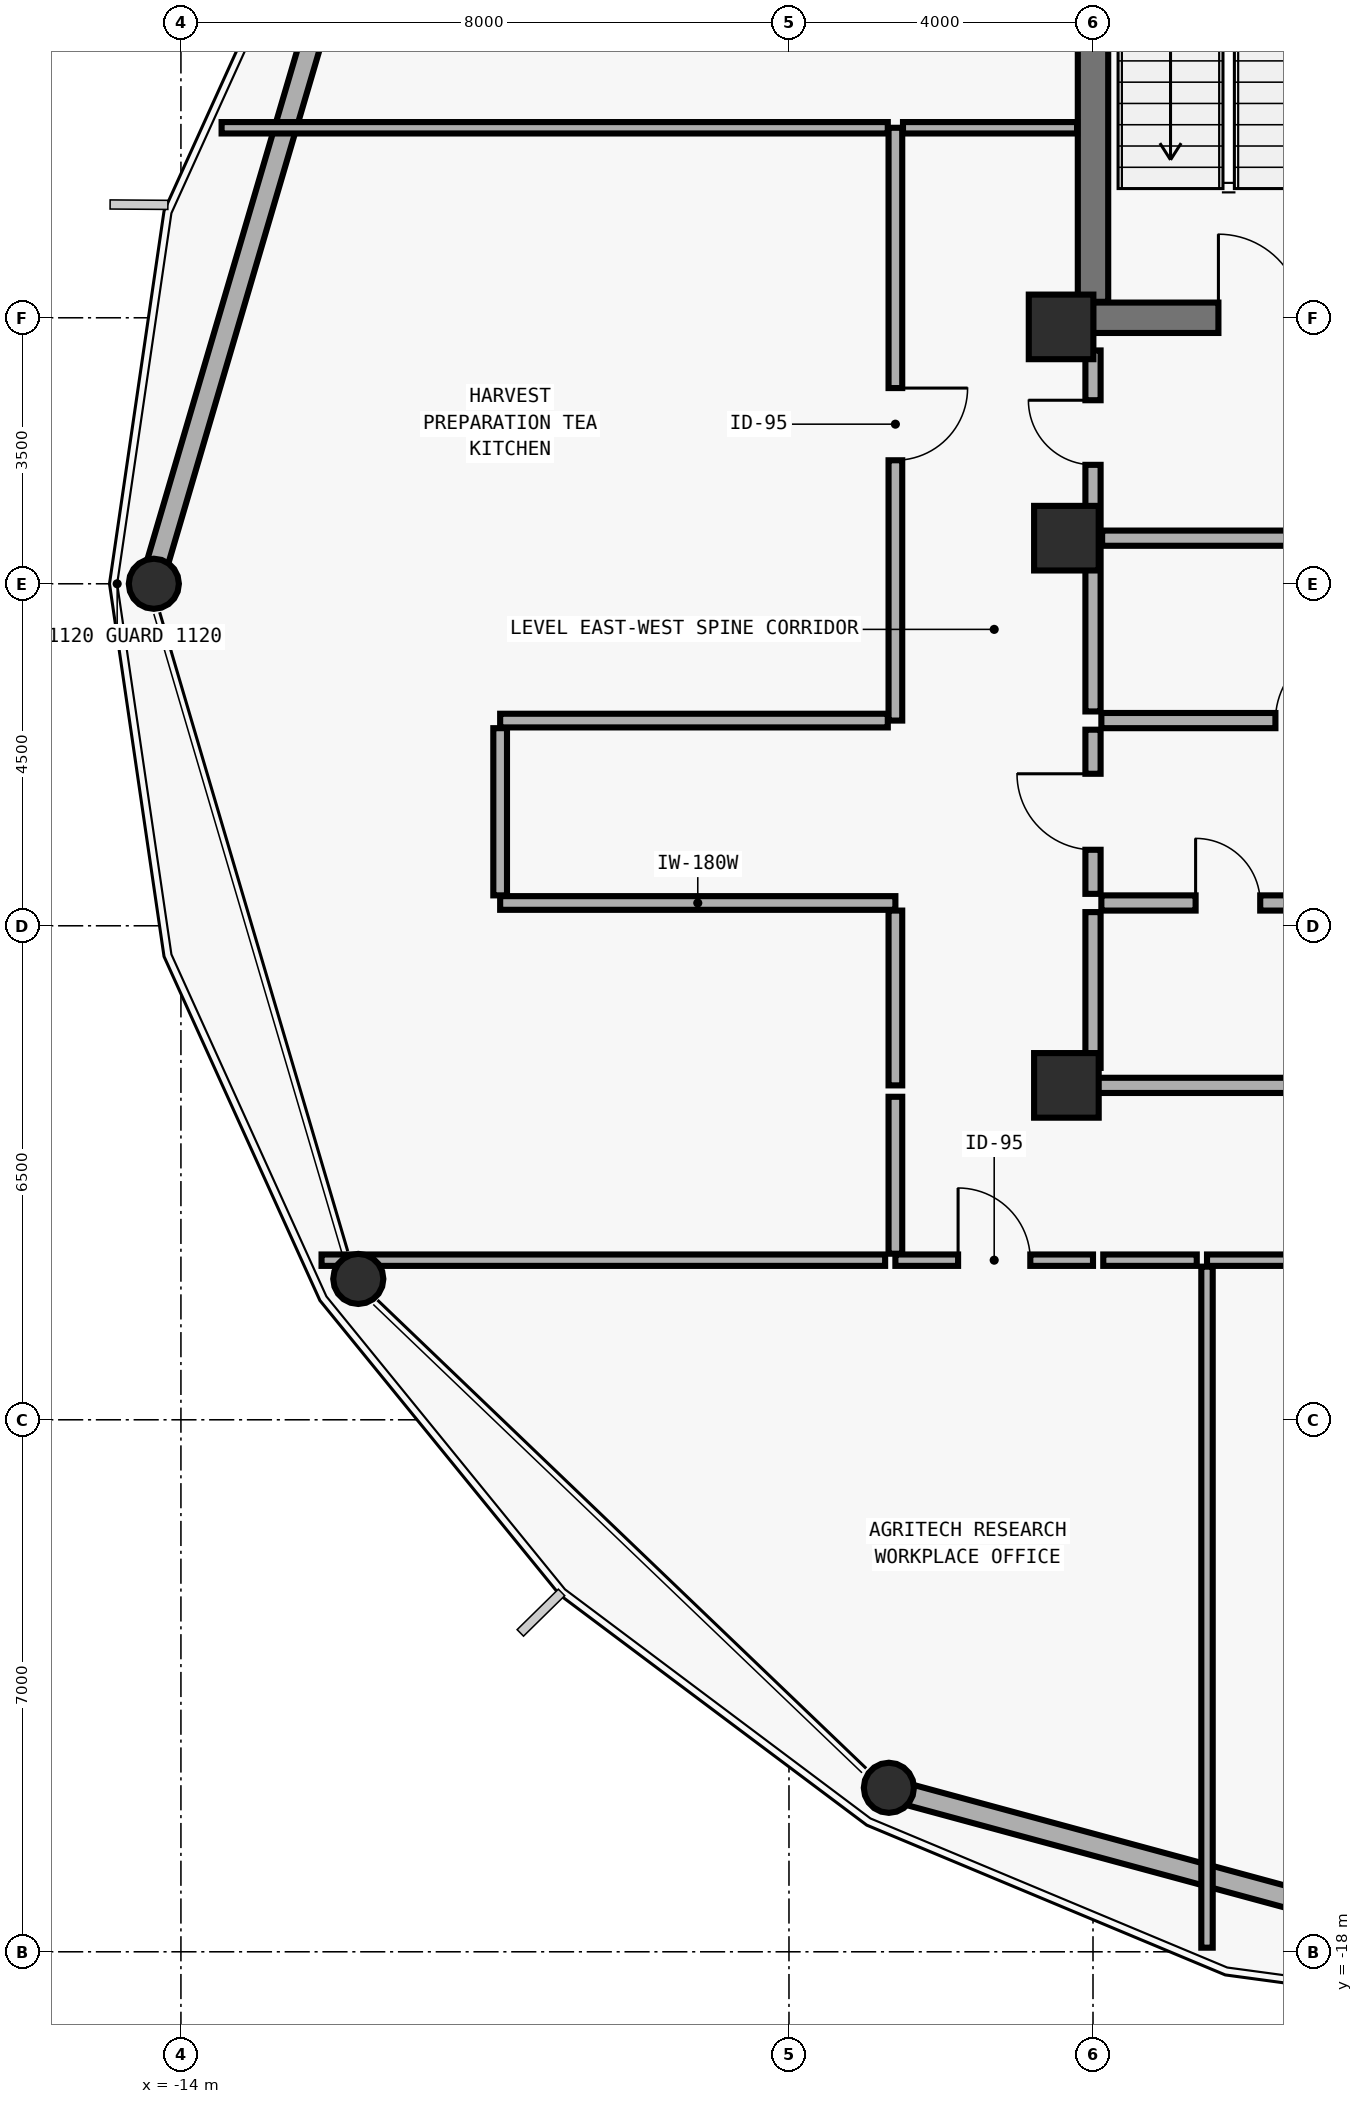
"""IFC4 building model, lengths in metres.
Left out: names, types, materials, properties, quantities, classifications, styles, units other than length and angle.
Written with IfcOpenShell. Run it as: python <this file> out.ifc"""

import sys

from ifc_helpers import new_model, si_unit, direction, frame, frame_2d, origin, origin_2d, place, context, subcontext, project, spatial, rectangle, hollow_circle, extrude, element, fill, save


model = new_model("IFC4")
c1 = context("Model", 3, precision=1e-05, world=origin(), true_north=direction((0.0, 1.0)))
c2 = subcontext(c1, "Body", "Model", "MODEL_VIEW")
j1 = project(units=[si_unit("LENGTHUNIT", "METRE"), si_unit("PLANEANGLEUNIT", "RADIAN")], contexts=[c1])
p1 = place(None, origin())
s1 = spatial("IfcSite", under=j1, at=p1, CompositionType="ELEMENT")
p2 = place(p1, origin())
s2 = spatial("IfcBuilding", under=s1, at=p2, CompositionType="ELEMENT")
p3 = place(p2, frame((0.0, 0.0, 207.6)))
s3 = spatial("IfcBuildingStorey", under=s2, at=p3, CompositionType="ELEMENT", Elevation=207.6)
p4 = place(p3, frame((-2.0, 3.5, 0.0), z_axis=(0.0, 0.0, 1.0), x_axis=(1.0, 0.0, 0.0)))
e1 = element("IfcWall", 1, at=p4, inside=s3, PredefinedType="SHEAR", context=c2, shape_type="SweptSolid", body=[
    extrude(rectangle(XDim=10.0, YDim=0.4, at=frame_2d((5.0, 0.0))), origin(), (0.0, 0.0, 1.0), 3.592),
])
p5 = place(p4, frame((1.65, 0.0, 0.0)))
e2 = element("IfcOpeningElement", 2, at=p5, cuts=e1, PredefinedType="OPENING", context=c2, shape_type="SweptSolid", body=[
    extrude(rectangle(XDim=1.1, YDim=2.15, at=frame_2d((0.55, 1.075))), frame((0.0, 0.21, 0.0), z_axis=(0.0, -1.0, 0.0), x_axis=(1.0, 0.0, 0.0)), (0.0, 0.0, 1.0), 0.42),
])
p6 = place(p4, frame((7.65, 0.0, 0.0)))
e3 = element("IfcOpeningElement", 3, at=p6, cuts=e1, PredefinedType="OPENING", context=c2, shape_type="SweptSolid", body=[
    extrude(rectangle(XDim=1.1, YDim=2.15, at=frame_2d((0.55, 1.075))), frame((0.0, 0.21, 0.0), z_axis=(0.0, -1.0, 0.0), x_axis=(1.0, 0.0, 0.0)), (0.0, 0.0, 1.0), 0.42),
])
p7 = place(p4, frame((3.72, 0.0, 0.0)))
e4 = element("IfcOpeningElement", 4, at=p7, cuts=e1, PredefinedType="OPENING", context=c2, shape_type="SweptSolid", body=[
    extrude(rectangle(XDim=1.1, YDim=2.2, at=frame_2d((0.55, 1.1))), frame((0.0, 0.21, 0.0), z_axis=(0.0, -1.0, 0.0), x_axis=(1.0, 0.0, 0.0)), (0.0, 0.0, 1.0), 0.42),
])
p8 = place(p4, frame((5.18, 0.0, 0.0)))
e5 = element("IfcOpeningElement", 5, at=p8, cuts=e1, PredefinedType="OPENING", context=c2, shape_type="SweptSolid", body=[
    extrude(rectangle(XDim=1.1, YDim=2.2, at=frame_2d((0.55, 1.1))), frame((0.0, 0.21, 0.0), z_axis=(0.0, -1.0, 0.0), x_axis=(1.0, 0.0, 0.0)), (0.0, 0.0, 1.0), 0.42),
])
p9 = place(p3, frame((-2.0, 3.71, 0.0), z_axis=(0.0, 0.0, 1.0), x_axis=(0.0, 1.0, 0.0)))
e6 = element("IfcWall", 6, at=p9, inside=s3, PredefinedType="SHEAR", context=c2, shape_type="SweptSolid", body=[
    extrude(rectangle(XDim=8.58, YDim=0.4, at=frame_2d((4.29, 0.0))), origin(), (0.0, 0.0, 1.0), 3.592),
])
for number, where, z_axis, x_axis in (
    (7, (-2.42, 3.38, 0.0), (0.0, 0.0, 1.0), (1.0, 0.0, 0.0)),
    (8, (-2.35, 0.6, 0.0), (0.0, 0.0, 1.0), (1.0, 0.0, 0.0)),
    (9, (-2.35, -6.6, 0.0), (0.0, 0.0, 1.0), (1.0, 0.0, 0.0)),
):
    element("IfcColumn", number, at=place(p3, frame(where, z_axis=z_axis, x_axis=x_axis)), inside=s3, PredefinedType="COLUMN", context=c2, shape_type="SweptSolid", body=[
        extrude(rectangle(XDim=0.85, YDim=0.85, at=origin_2d()), origin(), (0.0, 0.0, 1.0), 3.575),
    ])
p10 = place(p3, frame((-14.39, 0.0, 0.0), z_axis=(0.018708737519, 0.0, 0.999824976254), x_axis=(0.0, 1.0, 0.0)))
e10 = element("IfcColumn", 10, at=p10, inside=s3, PredefinedType="COLUMN", context=c2, shape_type="SweptSolid", body=[
    extrude(hollow_circle(Radius=0.33, WallThickness=0.025, at=origin_2d()), origin(), (0.0, 0.0, 1.0), 3.576),
])
p11 = place(p3, frame((-11.695, -9.155, 0.0), z_axis=(0.016182903558, 0.004779760545, 0.999857623625), x_axis=(-0.283261555535, 0.959042695168, 0.0)))
e11 = element("IfcColumn", 11, at=p11, inside=s3, PredefinedType="COLUMN", context=c2, shape_type="SweptSolid", body=[
    extrude(hollow_circle(Radius=0.33, WallThickness=0.025, at=origin_2d()), origin(), (0.0, 0.0, 1.0), 3.575),
])
p12 = place(p3, frame((-4.702, -15.857, 0.0), z_axis=(0.009355277453, 0.008262690305, 0.999922100332), x_axis=(-0.661983450847, 0.749518452612, 0.0)))
e12 = element("IfcColumn", 12, at=p12, inside=s3, PredefinedType="COLUMN", context=c2, shape_type="SweptSolid", body=[
    extrude(hollow_circle(Radius=0.33, WallThickness=0.025, at=origin_2d()), origin(), (0.0, 0.0, 1.0), 3.575),
])
p13 = place(p3, frame((-14.31, 0.273, 0.0), z_axis=(0.0, 0.0, 1.0), x_axis=(0.282359283475, 0.959308727697, 0.0)))
e13 = element("IfcWall", 13, at=p13, inside=s3, PredefinedType="SOLIDWALL", context=c2, shape_type="SweptSolid", body=[
    extrude(rectangle(XDim=8.973, YDim=0.28, at=frame_2d((4.487, 0.0))), origin(), (0.0, 0.0, 1.0), 2.93),
])
p14 = place(p3, frame((4.575, -18.371, 0.0), z_axis=(0.0, 0.0, 1.0), x_axis=(-0.965198020843, 0.261520134139, 0.0)))
e14 = element("IfcWall", 14, at=p14, inside=s3, PredefinedType="SOLIDWALL", context=c2, shape_type="SweptSolid", body=[
    extrude(rectangle(XDim=9.327, YDim=0.28, at=frame_2d((4.664, 0.0))), origin(), (0.0, 0.0, 1.0), 2.93),
])
p15 = place(p3, frame((-2.0, 0.72, 0.0), z_axis=(0.0, 0.0, 1.0), x_axis=(0.0, 1.0, 0.0)))
e15 = element("IfcWall", 15, at=p15, inside=s3, PredefinedType="MOVABLE", context=c2, shape_type="SweptSolid", body=[
    extrude(rectangle(XDim=2.35, YDim=0.2, at=frame_2d((1.175, 0.0))), origin(), (0.0, 0.0, 1.0), 2.692),
])
p16 = place(p15, frame((0.845, 0.0, 0.0)))
e16 = element("IfcOpeningElement", 16, at=p16, cuts=e15, PredefinedType="OPENING", context=c2, shape_type="SweptSolid", body=[
    extrude(rectangle(XDim=0.85, YDim=2.1, at=frame_2d((0.425, 1.05))), frame((0.0, 0.11, 0.0), z_axis=(0.0, -1.0, 0.0), x_axis=(1.0, 0.0, 0.0)), (0.0, 0.0, 1.0), 0.22),
])
p17 = place(p3, frame((-2.0, -4.08, 0.0), z_axis=(0.0, 0.0, 1.0), x_axis=(0.0, 1.0, 0.0)))
e17 = element("IfcWall", 17, at=p17, inside=s3, PredefinedType="MOVABLE", context=c2, shape_type="SweptSolid", body=[
    extrude(rectangle(XDim=2.16, YDim=0.2, at=frame_2d((1.08, 0.0))), origin(), (0.0, 0.0, 1.0), 3.012),
])
p18 = place(p17, frame((0.58, 0.0, 0.0)))
e18 = element("IfcOpeningElement", 18, at=p18, cuts=e17, PredefinedType="OPENING", context=c2, shape_type="SweptSolid", body=[
    extrude(rectangle(XDim=1.0, YDim=2.1, at=frame_2d((0.5, 1.05))), frame((0.0, 0.11, 0.0), z_axis=(0.0, -1.0, 0.0), x_axis=(1.0, 0.0, 0.0)), (0.0, 0.0, 1.0), 0.22),
])
p19 = place(p3, frame((-1.89, -1.8, 0.0), z_axis=(0.0, 0.0, 1.0), x_axis=(1.0, 0.0, 0.0)))
e19 = element("IfcWall", 19, at=p19, inside=s3, PredefinedType="MOVABLE", context=c2, shape_type="SweptSolid", body=[
    extrude(rectangle(XDim=5.73, YDim=0.2, at=frame_2d((2.865, 0.0))), origin(), (0.0, 0.0, 1.0), 3.36),
])
p20 = place(p19, frame((2.29, 0.0, 0.0)))
e20 = element("IfcOpeningElement", 20, at=p20, cuts=e19, PredefinedType="OPENING", context=c2, shape_type="SweptSolid", body=[
    extrude(rectangle(XDim=1.0, YDim=2.1, at=frame_2d((0.5, 1.05))), frame((0.0, 0.11, 0.0), z_axis=(0.0, -1.0, 0.0), x_axis=(1.0, 0.0, 0.0)), (0.0, 0.0, 1.0), 0.22),
])
p21 = place(p3, frame((-1.89, -4.2, 0.0), z_axis=(0.0, 0.0, 1.0), x_axis=(1.0, 0.0, 0.0)))
e21 = element("IfcWall", 21, at=p21, inside=s3, PredefinedType="MOVABLE", context=c2, shape_type="SweptSolid", body=[
    extrude(rectangle(XDim=5.73, YDim=0.2, at=frame_2d((2.865, 0.0))), origin(), (0.0, 0.0, 1.0), 3.36),
])
p22 = place(p21, frame((1.24, 0.0, 0.0)))
e22 = element("IfcOpeningElement", 22, at=p22, cuts=e21, PredefinedType="OPENING", context=c2, shape_type="SweptSolid", body=[
    extrude(rectangle(XDim=0.85, YDim=2.1, at=frame_2d((0.425, 1.05))), frame((0.0, 0.11, 0.0), z_axis=(0.0, -1.0, 0.0), x_axis=(1.0, 0.0, 0.0)), (0.0, 0.0, 1.0), 0.22),
])
p23 = place(p21, frame((4.34, 0.0, 0.0)))
e23 = element("IfcOpeningElement", 23, at=p23, cuts=e21, PredefinedType="OPENING", context=c2, shape_type="SweptSolid", body=[
    extrude(rectangle(XDim=0.85, YDim=2.1, at=frame_2d((0.425, 1.05))), frame((0.0, 0.11, 0.0), z_axis=(0.0, -1.0, 0.0), x_axis=(1.0, 0.0, 0.0)), (0.0, 0.0, 1.0), 0.22),
])
p24 = place(p3, frame((-4.6, -8.9, 0.0), z_axis=(0.0, 0.0, 1.0), x_axis=(1.0, 0.0, 0.0)))
e24 = element("IfcWall", 24, at=p24, inside=s3, PredefinedType="PARTITIONING", context=c2, shape_type="SweptSolid", body=[
    extrude(rectangle(XDim=2.6, YDim=0.15, at=frame_2d((1.3, 0.0))), origin(), (0.0, 0.0, 1.0), 3.36),
])
p25 = place(p24, frame((0.825, 0.0, 0.0)))
e25 = element("IfcOpeningElement", 25, at=p25, cuts=e24, PredefinedType="OPENING", context=c2, shape_type="SweptSolid", body=[
    extrude(rectangle(XDim=0.95, YDim=2.1, at=frame_2d((0.475, 1.05))), frame((0.0, 0.085, 0.0), z_axis=(0.0, -1.0, 0.0), x_axis=(1.0, 0.0, 0.0)), (0.0, 0.0, 1.0), 0.17),
])
p26 = place(p3, frame((-0.5, -8.9, 0.0), z_axis=(0.0, 0.0, 1.0), x_axis=(1.0, 0.0, 0.0)))
e26 = element("IfcWall", 26, at=p26, inside=s3, PredefinedType="PARTITIONING", context=c2, shape_type="SweptSolid", body=[
    extrude(rectangle(XDim=8.5, YDim=0.15, at=frame_2d((4.25, 0.0))), origin(), (0.0, 0.0, 1.0), 3.36),
])
p27 = place(p26, frame((3.775, 0.0, 0.0)))
e27 = element("IfcOpeningElement", 27, at=p27, cuts=e26, PredefinedType="OPENING", context=c2, shape_type="SweptSolid", body=[
    extrude(rectangle(XDim=0.95, YDim=2.1, at=frame_2d((0.475, 1.05))), frame((0.0, 0.085, 0.0), z_axis=(0.0, -1.0, 0.0), x_axis=(1.0, 0.0, 0.0)), (0.0, 0.0, 1.0), 0.17),
])
p28 = place(p3, frame((-4.6, 6.0, 0.0), z_axis=(0.0, 0.0, 1.0), x_axis=(0.0, -1.0, 0.0)))
e28 = element("IfcWall", 28, at=p28, inside=s3, PredefinedType="PLUMBINGWALL", context=c2, shape_type="SweptSolid", body=[
    extrude(rectangle(XDim=7.8, YDim=0.18, at=frame_2d((3.9, 0.0))), origin(), (0.0, 0.0, 1.0), 3.36),
])
p29 = place(p28, frame((3.425, 0.0, 0.0)))
e29 = element("IfcOpeningElement", 29, at=p29, cuts=e28, PredefinedType="OPENING", context=c2, shape_type="SweptSolid", body=[
    extrude(rectangle(XDim=0.95, YDim=2.1, at=frame_2d((0.475, 1.05))), frame((0.0, 0.1, 0.0), z_axis=(0.0, -1.0, 0.0), x_axis=(1.0, 0.0, 0.0)), (0.0, 0.0, 1.0), 0.2),
])
p30 = place(p3, frame((-1.88, 0.6, 0.0), z_axis=(0.0, 0.0, 1.0), x_axis=(1.0, 0.0, 0.0)))
e30 = element("IfcWall", 30, at=p30, inside=s3, PredefinedType="MOVABLE", context=c2, shape_type="SweptSolid", body=[
    extrude(rectangle(XDim=5.72, YDim=0.2, at=frame_2d((2.86, 0.0))), origin(), (0.0, 0.0, 1.0), 3.012),
])
p31 = place(p3, frame((-2.0, -1.68, 0.0), z_axis=(0.0, 0.0, 1.0), x_axis=(0.0, 1.0, 0.0)))
e31 = element("IfcWall", 31, at=p31, inside=s3, PredefinedType="MOVABLE", context=c2, shape_type="SweptSolid", body=[
    extrude(rectangle(XDim=2.16, YDim=0.2, at=frame_2d((1.08, 0.0))), origin(), (0.0, 0.0, 1.0), 3.012),
])
p32 = place(p3, frame((-2.0, -6.6, 0.0), z_axis=(0.0, 0.0, 1.0), x_axis=(1.0, 0.0, 0.0)))
e32 = element("IfcWall", 32, at=p32, inside=s3, PredefinedType="MOVABLE", context=c2, shape_type="SweptSolid", body=[
    extrude(rectangle(XDim=5.84, YDim=0.2, at=frame_2d((2.92, 0.0))), origin(), (0.0, 0.0, 1.0), 3.012),
])
p33 = place(p3, frame((-2.0, -6.37, 0.0), z_axis=(0.0, 0.0, 1.0), x_axis=(0.0, 1.0, 0.0)))
e33 = element("IfcWall", 33, at=p33, inside=s3, PredefinedType="MOVABLE", context=c2, shape_type="SweptSolid", body=[
    extrude(rectangle(XDim=2.05, YDim=0.2, at=frame_2d((1.025, 0.0))), origin(), (0.0, 0.0, 1.0), 3.012),
])
p34 = place(p3, frame((-1.865, -8.9, 0.0), z_axis=(0.0, 0.0, 1.0), x_axis=(1.0, 0.0, 0.0)))
e34 = element("IfcWall", 34, at=p34, inside=s3, PredefinedType="PARTITIONING", context=c2, shape_type="SweptSolid", body=[
    extrude(rectangle(XDim=1.23, YDim=0.15, at=frame_2d((0.615, 0.0))), origin(), (0.0, 0.0, 1.0), 3.36),
])
p35 = place(p3, frame((-0.5, -8.985, 0.0), z_axis=(0.0, 0.0, 1.0), x_axis=(0.0, -1.0, 0.0)))
e35 = element("IfcWall", 35, at=p35, inside=s3, PredefinedType="PARTITIONING", context=c2, shape_type="SweptSolid", body=[
    extrude(rectangle(XDim=8.961, YDim=0.15, at=frame_2d((4.48, 0.0))), origin(), (0.0, 0.0, 1.0), 3.36),
])
p36 = place(p3, frame((-12.15, -8.9, 0.0), z_axis=(0.0, 0.0, 1.0), x_axis=(1.0, 0.0, 0.0)))
e36 = element("IfcWall", 36, at=p36, inside=s3, PredefinedType="PARTITIONING", context=c2, shape_type="SweptSolid", body=[
    extrude(rectangle(XDim=7.415, YDim=0.15, at=frame_2d((3.708, 0.0))), origin(), (0.0, 0.0, 1.0), 2.842),
])
p37 = place(p3, frame((-4.7, -1.8, 0.0), z_axis=(0.0, 0.0, 1.0), x_axis=(-1.0, 0.0, 0.0)))
e37 = element("IfcWall", 37, at=p37, inside=s3, PredefinedType="PLUMBINGWALL", context=c2, shape_type="SweptSolid", body=[
    extrude(rectangle(XDim=5.1, YDim=0.18, at=frame_2d((2.55, 0.0))), origin(), (0.0, 0.0, 1.0), 3.36),
])
p38 = place(p3, frame((-9.8, -4.2, 0.0), z_axis=(0.0, 0.0, 1.0), x_axis=(1.0, 0.0, 0.0)))
e38 = element("IfcWall", 38, at=p38, inside=s3, PredefinedType="PLUMBINGWALL", context=c2, shape_type="SweptSolid", body=[
    extrude(rectangle(XDim=5.2, YDim=0.18, at=frame_2d((2.6, 0.0))), origin(), (0.0, 0.0, 1.0), 3.36),
])
p39 = place(p3, frame((-9.8, -1.9, 0.0), z_axis=(0.0, 0.0, 1.0), x_axis=(0.0, -1.0, 0.0)))
e39 = element("IfcWall", 39, at=p39, inside=s3, PredefinedType="PLUMBINGWALL", context=c2, shape_type="SweptSolid", body=[
    extrude(rectangle(XDim=2.2, YDim=0.18, at=frame_2d((1.1, 0.0))), origin(), (0.0, 0.0, 1.0), 3.36),
])
p40 = place(p3, frame((-4.6, -4.3, 0.0), z_axis=(0.0, 0.0, 1.0), x_axis=(0.0, -1.0, 0.0)))
e40 = element("IfcWall", 40, at=p40, inside=s3, PredefinedType="PLUMBINGWALL", context=c2, shape_type="SweptSolid", body=[
    extrude(rectangle(XDim=2.3, YDim=0.18, at=frame_2d((1.15, 0.0))), origin(), (0.0, 0.0, 1.0), 3.36),
])
p41 = place(p3, frame((-4.6, -6.75, 0.0), z_axis=(0.0, 0.0, 1.0), x_axis=(0.0, -1.0, 0.0)))
e41 = element("IfcWall", 41, at=p41, inside=s3, PredefinedType="PLUMBINGWALL", context=c2, shape_type="SweptSolid", body=[
    extrude(rectangle(XDim=2.065, YDim=0.18, at=frame_2d((1.032, 0.0))), origin(), (0.0, 0.0, 1.0), 3.36),
])
p42 = place(p3, frame((-13.465, 6.0, 0.0), z_axis=(0.0, 0.0, 1.0), x_axis=(1.0, 0.0, 0.0)))
e42 = element("IfcWall", 42, at=p42, inside=s3, PredefinedType="PARTITIONING", context=c2, shape_type="SweptSolid", body=[
    extrude(rectangle(XDim=8.765, YDim=0.15, at=frame_2d((4.383, 0.0))), origin(), (0.0, 0.0, 1.0), 3.36),
])
p43 = place(p3, frame((-2.21, 6.0, 0.0), z_axis=(0.0, 0.0, 1.0), x_axis=(-1.0, 0.0, 0.0)))
e43 = element("IfcWall", 43, at=p43, inside=s3, PredefinedType="PARTITIONING", context=c2, shape_type="SweptSolid", body=[
    extrude(rectangle(XDim=2.29, YDim=0.15, at=frame_2d((1.145, 0.0))), origin(), (0.0, 0.0, 1.0), 3.36),
])
p44 = place(p5, origin())
e44 = element("IfcDoor", 44, at=p44, inside=s3, OperationType="SINGLE_SWING_LEFT", PredefinedType="DOOR", context=c2, shape_type="SweptSolid", body=[
    extrude(rectangle(XDim=1.1, YDim=2.15, at=frame_2d((0.55, 1.075))), frame((0.0, 0.025, 0.0), z_axis=(0.0, -1.0, 0.0), x_axis=(1.0, 0.0, 0.0)), (0.0, 0.0, 1.0), 0.05),
])
fill(e2, e44)
p45 = place(p16, origin())
e45 = element("IfcDoor", 45, at=p45, inside=s3, OperationType="SINGLE_SWING_RIGHT", PredefinedType="DOOR", context=c2, shape_type="SweptSolid", body=[
    extrude(rectangle(XDim=0.85, YDim=2.1, at=frame_2d((0.425, 1.05))), frame((0.0, 0.025, 0.0), z_axis=(0.0, -1.0, 0.0), x_axis=(1.0, 0.0, 0.0)), (0.0, 0.0, 1.0), 0.05),
])
fill(e16, e45)
p46 = place(p18, origin())
e46 = element("IfcDoor", 46, at=p46, inside=s3, OperationType="SINGLE_SWING_RIGHT", PredefinedType="DOOR", context=c2, shape_type="SweptSolid", body=[
    extrude(rectangle(XDim=1.0, YDim=2.1, at=frame_2d((0.5, 1.05))), frame((0.0, 0.025, 0.0), z_axis=(0.0, -1.0, 0.0), x_axis=(1.0, 0.0, 0.0)), (0.0, 0.0, 1.0), 0.05),
])
fill(e18, e46)
p47 = place(p20, origin())
e47 = element("IfcDoor", 47, at=p47, inside=s3, OperationType="SINGLE_SWING_RIGHT", PredefinedType="DOOR", context=c2, shape_type="SweptSolid", body=[
    extrude(rectangle(XDim=1.0, YDim=2.1, at=frame_2d((0.5, 1.05))), frame((0.0, 0.025, 0.0), z_axis=(0.0, -1.0, 0.0), x_axis=(1.0, 0.0, 0.0)), (0.0, 0.0, 1.0), 0.05),
])
fill(e20, e47)
p48 = place(p22, origin())
e48 = element("IfcDoor", 48, at=p48, inside=s3, OperationType="SINGLE_SWING_LEFT", PredefinedType="DOOR", context=c2, shape_type="SweptSolid", body=[
    extrude(rectangle(XDim=0.85, YDim=2.1, at=frame_2d((0.425, 1.05))), frame((0.0, 0.025, 0.0), z_axis=(0.0, -1.0, 0.0), x_axis=(1.0, 0.0, 0.0)), (0.0, 0.0, 1.0), 0.05),
])
fill(e22, e48)
p49 = place(p25, origin())
e49 = element("IfcDoor", 49, at=p49, inside=s3, OperationType="SINGLE_SWING_LEFT", PredefinedType="DOOR", context=c2, shape_type="SweptSolid", body=[
    extrude(rectangle(XDim=0.95, YDim=2.1, at=frame_2d((0.475, 1.05))), frame((0.0, 0.025, 0.0), z_axis=(0.0, -1.0, 0.0), x_axis=(1.0, 0.0, 0.0)), (0.0, 0.0, 1.0), 0.05),
])
fill(e25, e49)
p50 = place(p29, origin())
e50 = element("IfcDoor", 50, at=p50, inside=s3, OperationType="SINGLE_SWING_LEFT", PredefinedType="DOOR", context=c2, shape_type="SweptSolid", body=[
    extrude(rectangle(XDim=0.95, YDim=2.1, at=frame_2d((0.475, 1.05))), frame((0.0, 0.025, 0.0), z_axis=(0.0, -1.0, 0.0), x_axis=(1.0, 0.0, 0.0)), (0.0, 0.0, 1.0), 0.05),
])
fill(e29, e50)
save(model, sys.argv[1])
